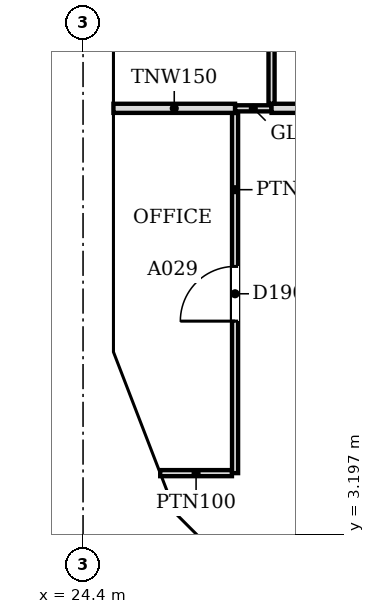
"""IFC4 building model, lengths in metres.
Left out: names, types, materials, properties, quantities, classifications, styles, units other than length and angle.
Written with IfcOpenShell. Run it as: python <this file> out.ifc"""

import sys

from ifc_helpers import new_model, si_unit, direction, frame, frame_2d, origin, place, context, subcontext, project, spatial, polyline, rectangle, outline, extrude, faceted_brep, source, transform, mapped, element, fill, save


model = new_model("IFC4")
c1 = context("Model", 3, precision=1e-05, world=origin(), true_north=direction((0.0, 1.0)))
c2 = subcontext(c1, "Body", "Model", "MODEL_VIEW")
j1 = project(units=[si_unit("LENGTHUNIT", "METRE"), si_unit("PLANEANGLEUNIT", "RADIAN")], contexts=[c1])
p1 = place(None, origin())
s1 = spatial("IfcSite", under=j1, at=p1, CompositionType="ELEMENT")
p2 = place(p1, origin())
s2 = spatial("IfcBuilding", under=s1, at=p2, CompositionType="ELEMENT")
p3 = place(p2, frame((0.0, 0.0, 48.6)))
s3 = spatial("IfcBuildingStorey", under=s2, at=p3, CompositionType="ELEMENT", Elevation=48.6)
m1 = source(origin(), c2, "Body", "Brep", [
    faceted_brep([(3.096, -0.25, 0.0), (6.1, -0.25, 3.8), (3.096, -0.25, 7.6), (0.047, -0.25, 3.857), (0.047, -0.25, 3.743), (0.0, 0.25, 3.8), (3.096, 0.25, 7.6), (6.053, 0.25, 3.859), (6.053, 0.25, 3.741), (3.096, 0.25, 0.0), (6.1, -0.0, 3.8), (0.0, 0.0, 3.8)], [[[0, 1, 2, 3, 4]], [[5, 6, 7, 8, 9]], [[9, 8, 10, 1, 0]], [[7, 6, 2, 1, 10]], [[6, 5, 11, 3, 2]], [[5, 9, 0, 4, 11]], [[4, 3, 11]], [[8, 7, 10]]]),
])
p4 = place(p3, frame((24.65, 12.247, -3.8), z_axis=(0.0, 0.0, 1.0), x_axis=(0.0, -1.0, 0.0)))
e1 = element("IfcWall", 1, at=p4, inside=s3, PredefinedType="SOLIDWALL", context=c2, shape_type="MappedRepresentation", body=[
    mapped(m1, transform((0.0, 0.0, 0.0), scale=1.0)),
])
m2 = source(origin(), c2, "Body", "SweptSolid", [
    extrude(outline(polyline([(3.094, 0.399), (5.781, 3.8), (3.094, 7.2), (0.323, 3.8), (3.094, 0.399)])), frame((0.0, 0.26, 0.0), z_axis=(0.0, -1.0, 0.0), x_axis=(1.0, 0.0, 0.0)), (0.0, 0.0, 1.0), 0.52),
])
p5 = place(p4, origin())
e2 = element("IfcOpeningElement", 2, at=p5, cuts=e1, PredefinedType="OPENING", context=c2, shape_type="MappedRepresentation", body=[
    mapped(m2, transform((0.0, 0.0, 0.0), scale=1.0)),
])
m3 = source(origin(), c2, "Body", "Brep", [
    faceted_brep([(2.95, -0.25, 0.0), (3.003, -0.25, 0.068), (3.003, -0.25, 7.531), (2.95, -0.25, 7.6), (0.0, -0.25, 3.8), (0.047, 0.25, 3.86), (2.898, 0.25, 7.532), (2.898, 0.25, 0.068), (0.047, 0.25, 3.74), (2.95, 0.0, 0.0), (2.95, 0.0, 7.6), (0.0, 0.0, 3.8)], [[[0, 1, 2, 3, 4]], [[5, 6, 7, 8]], [[1, 0, 9]], [[10, 3, 2]], [[6, 5, 11, 4, 3, 10]], [[8, 7, 9, 0, 4, 11]], [[8, 11, 5]], [[1, 9, 7, 6, 10, 2]]]),
])
p6 = place(p3, frame((24.65, 6.146, -3.8), z_axis=(0.0, 0.0, 1.0), x_axis=(0.359953949349, -0.932970071518, 0.0)))
e3 = element("IfcWall", 3, at=p6, inside=s3, PredefinedType="SOLIDWALL", context=c2, shape_type="MappedRepresentation", body=[
    mapped(m3, transform((0.0, 0.0, 0.0), scale=1.0)),
])
m4 = source(origin(), c2, "Body", "SweptSolid", [
    extrude(outline(polyline([(2.75, 6.935), (0.316, 3.8), (2.75, 0.665), (2.75, 6.935)])), frame((0.0, 0.26, 0.0), z_axis=(0.0, -1.0, 0.0), x_axis=(1.0, 0.0, 0.0)), (0.0, 0.0, 1.0), 0.52),
])
p7 = place(p6, origin())
e4 = element("IfcOpeningElement", 4, at=p7, cuts=e3, PredefinedType="OPENING", context=c2, shape_type="MappedRepresentation", body=[
    mapped(m4, transform((0.0, 0.0, 0.0), scale=1.0)),
])
m5 = source(origin(), c2, "Body", "Brep", [
    faceted_brep([(0.053, -0.25, 0.0), (2.997, -0.25, 3.8), (0.053, -0.25, 7.6), (0.0, -0.25, 7.532), (0.0, -0.25, 0.068), (0.106, 0.25, 7.531), (2.944, 0.25, 3.868), (2.944, 0.25, 3.732), (0.106, 0.25, 0.068), (2.997, 0.0, 3.8), (0.053, 0.0, 0.0), (0.053, 0.0, 7.6)], [[[0, 1, 2, 3, 4]], [[5, 6, 7, 8]], [[8, 7, 9, 1, 0, 10]], [[6, 5, 11, 2, 1, 9]], [[3, 2, 11]], [[10, 0, 4]], [[8, 10, 4, 3, 11, 5]], [[7, 6, 9]]]),
])
p8 = place(p3, frame((25.675, 3.431, -3.8), z_axis=(0.0, 0.0, 1.0), x_axis=(0.707106781187, -0.707106781187, 0.0)))
e5 = element("IfcWall", 5, at=p8, inside=s3, PredefinedType="SOLIDWALL", context=c2, shape_type="MappedRepresentation", body=[
    mapped(m5, transform((0.0, 0.0, 0.0), scale=1.0)),
])
m6 = source(origin(), c2, "Body", "SweptSolid", [
    extrude(outline(polyline([(0.253, 0.666), (2.681, 3.8), (0.253, 6.934), (0.253, 0.666)])), frame((0.0, 0.26, 0.0), z_axis=(0.0, -1.0, 0.0), x_axis=(1.0, 0.0, 0.0)), (0.0, 0.0, 1.0), 0.52),
])
p9 = place(p8, origin())
e6 = element("IfcOpeningElement", 6, at=p9, cuts=e5, PredefinedType="OPENING", context=c2, shape_type="MappedRepresentation", body=[
    mapped(m6, transform((0.0, 0.0, 0.0), scale=1.0)),
])
p10 = place(p2, frame((0.0, 0.0, 52.4)))
s4 = spatial("IfcBuildingStorey", under=s2, at=p10, CompositionType="ELEMENT", Elevation=52.4)
m7 = source(origin(), c2, "Body", "Brep", [
    faceted_brep([(0.093, -0.25, 0.057), (3.143, -0.25, 3.8), (0.093, -0.25, 7.543), (0.0, 0.25, 7.544), (0.047, 0.25, 7.6), (3.143, 0.25, 3.8), (0.047, 0.25, 0.0), (0.0, 0.25, 0.056), (0.047, 0.0, 0.0), (0.047, 0.0, 7.6)], [[[0, 1, 2]], [[3, 4, 5, 6, 7]], [[6, 5, 1, 0, 8]], [[5, 4, 9, 2, 1]], [[4, 3, 9]], [[7, 6, 8]], [[7, 8, 0, 2, 9, 3]]]),
])
p11 = place(p10, frame((24.65, 12.293, -3.8), z_axis=(0.0, 0.0, 1.0), x_axis=(0.0, -1.0, 0.0)))
e7 = element("IfcWall", 7, at=p11, inside=s4, PredefinedType="SOLIDWALL", context=c2, shape_type="MappedRepresentation", body=[
    mapped(m7, transform((0.0, 0.0, 0.0), scale=1.0)),
])
m8 = source(origin(), c2, "Body", "SweptSolid", [
    extrude(outline(polyline([(0.247, 0.641), (2.821, 3.8), (0.247, 6.959), (0.247, 0.641)])), frame((0.0, 0.26, 0.0), z_axis=(0.0, -1.0, 0.0), x_axis=(1.0, 0.0, 0.0)), (0.0, 0.0, 1.0), 0.52),
])
p12 = place(p11, origin())
e8 = element("IfcOpeningElement", 8, at=p12, cuts=e7, PredefinedType="OPENING", context=c2, shape_type="MappedRepresentation", body=[
    mapped(m8, transform((0.0, 0.0, 0.0), scale=1.0)),
])
m9 = source(origin(), c2, "Body", "Brep", [
    faceted_brep([(3.003, -0.25, 0.0), (3.05, -0.25, 0.06), (3.05, -0.25, 7.54), (3.003, -0.25, 7.6), (0.0, -0.25, 3.8), (0.0, 0.25, 3.8), (2.957, 0.25, 7.541), (2.957, 0.25, 0.059), (3.003, 0.0, 0.0), (3.003, 0.0, 7.6)], [[[0, 1, 2, 3, 4]], [[5, 6, 7]], [[1, 0, 8]], [[9, 3, 2]], [[6, 5, 4, 3, 9]], [[5, 7, 8, 0, 4]], [[1, 8, 7, 6, 9, 2]]]),
])
p13 = place(p10, frame((24.65, 9.15, -3.8), z_axis=(0.0, 0.0, 1.0), x_axis=(0.0, -1.0, 0.0)))
e9 = element("IfcWall", 9, at=p13, inside=s4, PredefinedType="SOLIDWALL", context=c2, shape_type="MappedRepresentation", body=[
    mapped(m9, transform((0.0, 0.0, 0.0), scale=1.0)),
])
m10 = source(origin(), c2, "Body", "SweptSolid", [
    extrude(outline(polyline([(2.803, 6.944), (0.319, 3.8), (2.803, 0.656), (2.803, 6.944)])), frame((0.0, 0.26, 0.0), z_axis=(0.0, -1.0, 0.0), x_axis=(1.0, 0.0, 0.0)), (0.0, 0.0, 1.0), 0.52),
])
p14 = place(p13, origin())
e10 = element("IfcOpeningElement", 10, at=p14, cuts=e9, PredefinedType="OPENING", context=c2, shape_type="MappedRepresentation", body=[
    mapped(m10, transform((0.0, 0.0, 0.0), scale=1.0)),
])
m11 = source(origin(), c2, "Body", "Brep", [
    faceted_brep([(0.047, -0.25, 0.0), (2.997, -0.25, 3.8), (0.047, -0.25, 7.6), (0.0, -0.25, 7.541), (0.0, -0.25, 0.059), (0.093, 0.25, 7.54), (2.944, 0.25, 3.868), (2.944, 0.25, 3.732), (0.093, 0.25, 0.06), (2.997, 0.0, 3.8), (0.047, 0.0, 0.0), (0.047, 0.0, 7.6)], [[[0, 1, 2, 3, 4]], [[5, 6, 7, 8]], [[8, 7, 9, 1, 0, 10]], [[6, 5, 11, 2, 1, 9]], [[3, 2, 11]], [[10, 0, 4]], [[8, 10, 4, 3, 11, 5]], [[9, 7, 6]]]),
])
p15 = place(p10, frame((24.633, 6.19, -3.8), z_axis=(0.0, 0.0, 1.0), x_axis=(0.359901446078, -0.932990326376, 0.0)))
e11 = element("IfcWall", 11, at=p15, inside=s4, PredefinedType="SOLIDWALL", context=c2, shape_type="MappedRepresentation", body=[
    mapped(m11, transform((0.0, 0.0, 0.0), scale=1.0)),
])
m12 = source(origin(), c2, "Body", "SweptSolid", [
    extrude(outline(polyline([(0.247, 0.665), (2.681, 3.8), (0.247, 6.935), (0.247, 0.665)])), frame((0.0, 0.26, 0.0), z_axis=(0.0, -1.0, 0.0), x_axis=(1.0, 0.0, 0.0)), (0.0, 0.0, 1.0), 0.52),
])
p16 = place(p15, origin())
e12 = element("IfcOpeningElement", 12, at=p16, cuts=e11, PredefinedType="OPENING", context=c2, shape_type="MappedRepresentation", body=[
    mapped(m12, transform((0.0, 0.0, 0.0), scale=1.0)),
])
m13 = source(origin(), c2, "Body", "Brep", [
    faceted_brep([(2.944, -0.25, 0.0), (2.997, -0.25, 0.068), (2.997, -0.25, 7.532), (2.944, -0.25, 7.6), (0.0, -0.25, 3.8), (0.053, 0.25, 3.868), (2.891, 0.25, 7.532), (2.891, 0.25, 0.068), (0.053, 0.25, 3.731), (2.944, 0.0, 0.0), (2.944, 0.0, 7.6), (0.0, 0.0, 3.8)], [[[0, 1, 2, 3, 4]], [[5, 6, 7, 8]], [[1, 0, 9]], [[10, 3, 2]], [[6, 5, 11, 4, 3, 10]], [[8, 7, 9, 0, 4, 11]], [[8, 11, 5]], [[1, 9, 7, 6, 10, 2]]]),
])
p17 = place(p10, frame((25.712, 3.394, -3.8), z_axis=(0.0, 0.0, 1.0), x_axis=(0.707066050402, -0.707147509625, 0.0)))
e13 = element("IfcWall", 13, at=p17, inside=s4, PredefinedType="SOLIDWALL", context=c2, shape_type="MappedRepresentation", body=[
    mapped(m13, transform((0.0, 0.0, 0.0), scale=1.0)),
])
m14 = source(origin(), c2, "Body", "SweptSolid", [
    extrude(outline(polyline([(2.744, 6.934), (0.316, 3.8), (2.744, 0.666), (2.744, 6.934)])), frame((0.0, 0.26, 0.0), z_axis=(0.0, -1.0, 0.0), x_axis=(1.0, 0.0, 0.0)), (0.0, 0.0, 1.0), 0.52),
])
p18 = place(p17, origin())
e14 = element("IfcOpeningElement", 14, at=p18, cuts=e13, PredefinedType="OPENING", context=c2, shape_type="MappedRepresentation", body=[
    mapped(m14, transform((0.0, 0.0, 0.0), scale=1.0)),
])
p19 = place(p3, frame((25.669, 4.2, 0.0), z_axis=(0.0, 0.0, 1.0), x_axis=(1.0, 0.0, 0.0)))
e15 = element("IfcWall", 15, at=p19, inside=s3, PredefinedType="PARTITIONING", context=c2, shape_type="SweptSolid", body=[
    extrude(rectangle(XDim=1.18, YDim=0.1, at=frame_2d((0.59, 0.0))), origin(), (0.0, 0.0, 1.0), 3.067),
])
p20 = place(p3, frame((26.9, 4.2, 0.0), z_axis=(0.0, 0.0, 1.0), x_axis=(0.0, 1.0, 0.0)))
e16 = element("IfcWall", 16, at=p20, inside=s3, PredefinedType="PARTITIONING", context=c2, shape_type="SweptSolid", body=[
    extrude(rectangle(XDim=5.924, YDim=0.1, at=frame_2d((2.962, 0.0))), origin(), (0.0, 0.0, 1.0), 3.067),
])
m15 = source(origin(), c2, "Body", "SweptSolid", [
    extrude(rectangle(XDim=0.9, YDim=2.1, at=frame_2d((0.45, 1.05))), frame((0.0, 0.06, 0.0), z_axis=(0.0, -1.0, 0.0), x_axis=(1.0, 0.0, 0.0)), (0.0, 0.0, 1.0), 0.12),
])
p21 = place(p20, frame((2.5, 0.0, 0.0)))
e17 = element("IfcOpeningElement", 17, at=p21, cuts=e16, PredefinedType="OPENING", context=c2, shape_type="MappedRepresentation", body=[
    mapped(m15, transform((0.0, 0.0, 0.0), scale=1.0)),
])
p22 = place(p3, frame((24.9, 10.2, 0.0), z_axis=(0.0, 0.0, 1.0), x_axis=(1.0, 0.0, 0.0)))
e18 = element("IfcWall", 18, at=p22, inside=s3, PredefinedType="PARTITIONING", context=c2, shape_type="SweptSolid", body=[
    extrude(rectangle(XDim=2.0, YDim=0.15, at=frame_2d((1.0, 0.0))), origin(), (0.0, 0.0, 1.0), 3.067),
])
p23 = place(p3, frame((26.901, 10.2, 0.0), z_axis=(0.0, 0.0, 1.0), x_axis=(1.0, 0.0, 0.0)))
e19 = element("IfcWall", 19, at=p23, inside=s3, PredefinedType="PARTITIONING", context=c2, shape_type="SweptSolid", body=[
    extrude(rectangle(XDim=0.598, YDim=0.1, at=frame_2d((0.299, 0.0))), origin(), (0.0, 0.0, 1.0), 3.067),
])
p24 = place(p3, frame((27.5, 10.2, 0.0), z_axis=(0.0, 0.0, 1.0), x_axis=(1.0, 0.0, 0.0)))
e20 = element("IfcWall", 20, at=p24, inside=s3, PredefinedType="PARTITIONING", context=c2, shape_type="SweptSolid", body=[
    extrude(rectangle(XDim=16.424, YDim=0.15, at=frame_2d((8.212, 0.0))), origin(), (0.0, 0.0, 1.0), 3.067),
])
p25 = place(p3, frame((27.5, 10.276, 0.0), z_axis=(0.0, 0.0, 1.0), x_axis=(0.0, 1.0, 0.0)))
e21 = element("IfcWall", 21, at=p25, inside=s3, PredefinedType="PARTITIONING", context=c2, shape_type="SweptSolid", body=[
    extrude(rectangle(XDim=8.448, YDim=0.1, at=frame_2d((4.224, 0.0))), origin(), (0.0, 0.0, 1.0), 3.067),
])
p26 = place(p25, frame((3.8, 0.0, 0.0)))
e22 = element("IfcOpeningElement", 22, at=p26, cuts=e21, PredefinedType="OPENING", context=c2, shape_type="MappedRepresentation", body=[
    mapped(m15, transform((0.0, 0.0, 0.0), scale=1.0)),
])
m16 = source(origin(), c2, "Body", "SweptSolid", [
    extrude(rectangle(XDim=0.9, YDim=2.1, at=frame_2d((0.45, 1.05))), frame((0.0, 0.025, 0.0), z_axis=(0.0, -1.0, 0.0), x_axis=(1.0, 0.0, 0.0)), (0.0, 0.0, 1.0), 0.05),
])
p27 = place(p21, origin())
e23 = element("IfcDoor", 23, at=p27, inside=s3, OperationType="SINGLE_SWING_LEFT", PredefinedType="DOOR", context=c2, shape_type="MappedRepresentation", body=[
    mapped(m16, transform((0.0, 0.0, 0.0), scale=1.0)),
])
fill(e17, e23)
save(model, sys.argv[1])
